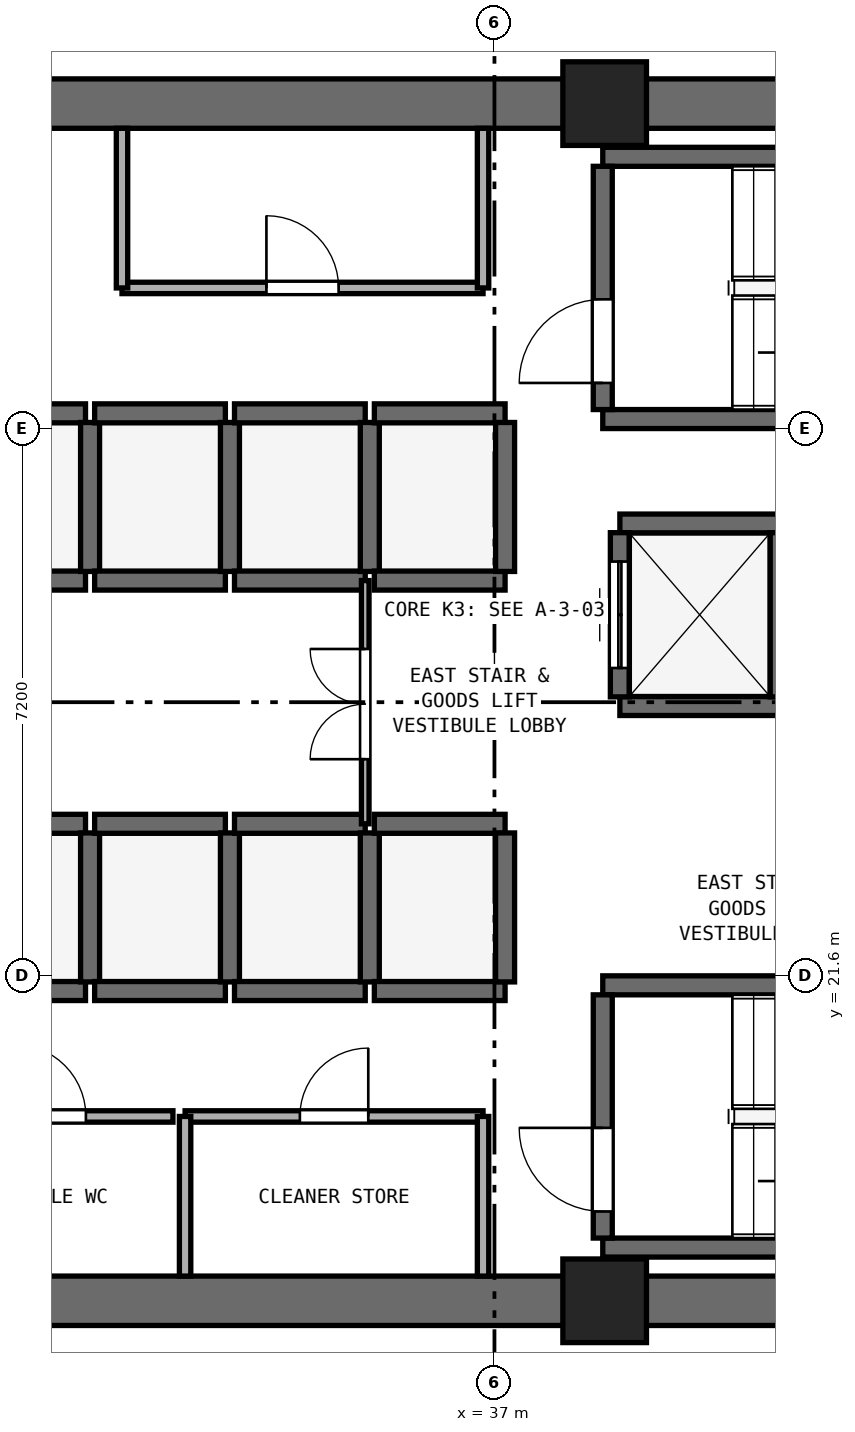
"""IFC4 building model, lengths in metres.
Left out: names, types, materials, properties, quantities, classifications, styles, units other than length and angle.
Written with IfcOpenShell. Run it as: python <this file> out.ifc"""

import sys

from ifc_helpers import new_model, si_unit, direction, frame, frame_2d, origin, origin_2d, place, context, subcontext, project, spatial, rectangle, extrude, element, fill, save


model = new_model("IFC4")
c1 = context("Model", 3, precision=1e-05, world=origin(), true_north=direction((0.0, 1.0)))
c2 = subcontext(c1, "Body", "Model", "MODEL_VIEW")
j1 = project(units=[si_unit("LENGTHUNIT", "METRE"), si_unit("PLANEANGLEUNIT", "RADIAN")], contexts=[c1])
p1 = place(None, origin())
s1 = spatial("IfcSite", under=j1, at=p1, CompositionType="ELEMENT")
p2 = place(p1, origin())
s2 = spatial("IfcBuilding", under=s1, at=p2, CompositionType="ELEMENT")
p3 = place(p2, frame((0.0, 0.0, 78.2)))
s3 = spatial("IfcBuildingStorey", under=s2, at=p3, CompositionType="ELEMENT", Elevation=78.2)
for number, where, z_axis, x_axis in (
    (1, (25.4, 17.325, 0.0), (0.0, 0.0, 1.0), (1.0, 0.0, 0.0)),
    (2, (25.4, 33.075, 0.0), (0.0, 0.0, 1.0), (1.0, 0.0, 0.0)),
):
    element("IfcWall", number, at=place(p3, frame(where, z_axis=z_axis, x_axis=x_axis)), inside=s3, PredefinedType="SHEAR", context=c2, shape_type="SweptSolid", body=[
        extrude(rectangle(XDim=23.2, YDim=0.65, at=frame_2d((11.6, 0.0))), origin(), (0.0, 0.0, 1.0), 3.525),
    ])
for number, where, z_axis, x_axis in (
    (3, (38.45, 17.325, 0.0), (0.0, 0.0, 1.0), (1.0, 0.0, 0.0)),
    (4, (38.45, 33.075, 0.0), (0.0, 0.0, 1.0), (1.0, 0.0, 0.0)),
):
    element("IfcColumn", number, at=place(p3, frame(where, z_axis=z_axis, x_axis=x_axis)), inside=s3, PredefinedType="PILASTER", context=c2, shape_type="SweptSolid", body=[
        extrude(rectangle(XDim=1.1, YDim=1.1, at=origin_2d()), origin(), (0.0, 0.0, 1.0), 3.8),
    ])
for number, where, z_axis, x_axis in (
    (5, (38.425, 28.925, 0.0), (0.0, 0.0, 1.0), (1.0, 0.0, 0.0)),
    (6, (38.425, 32.375, 0.0), (0.0, 0.0, 1.0), (1.0, 0.0, 0.0)),
):
    element("IfcWall", number, at=place(p3, frame(where, z_axis=z_axis, x_axis=x_axis)), inside=s3, PredefinedType="SHEAR", context=c2, shape_type="SweptSolid", body=[
        extrude(rectangle(XDim=7.3, YDim=0.25, at=frame_2d((3.65, 0.0))), origin(), (0.0, 0.0, 1.0), 3.525),
    ])
p4 = place(p3, frame((38.425, 29.05, 0.0), z_axis=(0.0, 0.0, 1.0), x_axis=(0.0, 1.0, 0.0)))
e7 = element("IfcWall", 7, at=p4, inside=s3, PredefinedType="SHEAR", context=c2, shape_type="SweptSolid", body=[
    extrude(rectangle(XDim=3.2, YDim=0.25, at=frame_2d((1.6, 0.0))), origin(), (0.0, 0.0, 1.0), 3.525),
])
p5 = place(p4, frame((0.35, 0.0, 0.0)))
e8 = element("IfcOpeningElement", 8, at=p5, cuts=e7, PredefinedType="OPENING", context=c2, shape_type="SweptSolid", body=[
    extrude(rectangle(XDim=1.1, YDim=2.15, at=frame_2d((0.55, 1.075))), frame((0.0, 0.135, 0.0), z_axis=(0.0, -1.0, 0.0), x_axis=(1.0, 0.0, 0.0)), (0.0, 0.0, 1.0), 0.27),
])
for number, where, z_axis, x_axis in (
    (9, (38.425, 18.025, 0.0), (0.0, 0.0, 1.0), (1.0, 0.0, 0.0)),
    (10, (38.425, 21.475, 0.0), (0.0, 0.0, 1.0), (1.0, 0.0, 0.0)),
):
    element("IfcWall", number, at=place(p3, frame(where, z_axis=z_axis, x_axis=x_axis)), inside=s3, PredefinedType="SHEAR", context=c2, shape_type="SweptSolid", body=[
        extrude(rectangle(XDim=7.3, YDim=0.25, at=frame_2d((3.65, 0.0))), origin(), (0.0, 0.0, 1.0), 3.525),
    ])
p6 = place(p3, frame((38.425, 18.15, 0.0), z_axis=(0.0, 0.0, 1.0), x_axis=(0.0, 1.0, 0.0)))
e11 = element("IfcWall", 11, at=p6, inside=s3, PredefinedType="SHEAR", context=c2, shape_type="SweptSolid", body=[
    extrude(rectangle(XDim=3.2, YDim=0.25, at=frame_2d((1.6, 0.0))), origin(), (0.0, 0.0, 1.0), 3.525),
])
p7 = place(p6, frame((0.35, 0.0, 0.0)))
e12 = element("IfcOpeningElement", 12, at=p7, cuts=e11, PredefinedType="OPENING", context=c2, shape_type="SweptSolid", body=[
    extrude(rectangle(XDim=1.1, YDim=2.15, at=frame_2d((0.55, 1.075))), frame((0.0, 0.135, 0.0), z_axis=(0.0, -1.0, 0.0), x_axis=(1.0, 0.0, 0.0)), (0.0, 0.0, 1.0), 0.27),
])
for number, where, z_axis, x_axis in (
    (13, (29.9, 21.4, 0.0), (0.0, 0.0, 1.0), (1.0, 0.0, 0.0)),
    (14, (29.9, 23.6, 0.0), (0.0, 0.0, 1.0), (1.0, 0.0, 0.0)),
):
    element("IfcWall", number, at=place(p3, frame(where, z_axis=z_axis, x_axis=x_axis)), inside=s3, PredefinedType="SHEAR", context=c2, shape_type="SweptSolid", body=[
        extrude(rectangle(XDim=1.72, YDim=0.25, at=frame_2d((0.86, 0.0))), origin(), (0.0, 0.0, 1.0), 3.525),
    ])
p8 = place(p3, frame((31.68, 21.52, 0.0), z_axis=(0.0, 0.0, 1.0), x_axis=(0.0, 1.0, 0.0)))
e15 = element("IfcWall", 15, at=p8, inside=s3, PredefinedType="SHEAR", context=c2, shape_type="SweptSolid", body=[
    extrude(rectangle(XDim=1.96, YDim=0.25, at=frame_2d((0.98, 0.0))), origin(), (0.0, 0.0, 1.0), 3.525),
])
for number, where, z_axis, x_axis in (
    (16, (31.74, 21.4, 0.0), (0.0, 0.0, 1.0), (1.0, 0.0, 0.0)),
    (17, (31.74, 23.6, 0.0), (0.0, 0.0, 1.0), (1.0, 0.0, 0.0)),
):
    element("IfcWall", number, at=place(p3, frame(where, z_axis=z_axis, x_axis=x_axis)), inside=s3, PredefinedType="SHEAR", context=c2, shape_type="SweptSolid", body=[
        extrude(rectangle(XDim=1.72, YDim=0.25, at=frame_2d((0.86, 0.0))), origin(), (0.0, 0.0, 1.0), 3.525),
    ])
p9 = place(p3, frame((33.52, 21.52, 0.0), z_axis=(0.0, 0.0, 1.0), x_axis=(0.0, 1.0, 0.0)))
e18 = element("IfcWall", 18, at=p9, inside=s3, PredefinedType="SHEAR", context=c2, shape_type="SweptSolid", body=[
    extrude(rectangle(XDim=1.96, YDim=0.25, at=frame_2d((0.98, 0.0))), origin(), (0.0, 0.0, 1.0), 3.525),
])
for number, where, z_axis, x_axis in (
    (19, (33.58, 21.4, 0.0), (0.0, 0.0, 1.0), (1.0, 0.0, 0.0)),
    (20, (33.58, 23.6, 0.0), (0.0, 0.0, 1.0), (1.0, 0.0, 0.0)),
):
    element("IfcWall", number, at=place(p3, frame(where, z_axis=z_axis, x_axis=x_axis)), inside=s3, PredefinedType="SHEAR", context=c2, shape_type="SweptSolid", body=[
        extrude(rectangle(XDim=1.72, YDim=0.25, at=frame_2d((0.86, 0.0))), origin(), (0.0, 0.0, 1.0), 3.525),
    ])
p10 = place(p3, frame((35.36, 21.52, 0.0), z_axis=(0.0, 0.0, 1.0), x_axis=(0.0, 1.0, 0.0)))
e21 = element("IfcWall", 21, at=p10, inside=s3, PredefinedType="SHEAR", context=c2, shape_type="SweptSolid", body=[
    extrude(rectangle(XDim=1.96, YDim=0.25, at=frame_2d((0.98, 0.0))), origin(), (0.0, 0.0, 1.0), 3.525),
])
for number, where, z_axis, x_axis in (
    (22, (35.42, 21.4, 0.0), (0.0, 0.0, 1.0), (1.0, 0.0, 0.0)),
    (23, (35.42, 23.6, 0.0), (0.0, 0.0, 1.0), (1.0, 0.0, 0.0)),
):
    element("IfcWall", number, at=place(p3, frame(where, z_axis=z_axis, x_axis=x_axis)), inside=s3, PredefinedType="SHEAR", context=c2, shape_type="SweptSolid", body=[
        extrude(rectangle(XDim=1.72, YDim=0.25, at=frame_2d((0.86, 0.0))), origin(), (0.0, 0.0, 1.0), 3.525),
    ])
p11 = place(p3, frame((37.14, 21.52, 0.0), z_axis=(0.0, 0.0, 1.0), x_axis=(0.0, 1.0, 0.0)))
e24 = element("IfcWall", 24, at=p11, inside=s3, PredefinedType="SHEAR", context=c2, shape_type="SweptSolid", body=[
    extrude(rectangle(XDim=1.96, YDim=0.25, at=frame_2d((0.98, 0.0))), origin(), (0.0, 0.0, 1.0), 3.525),
])
for number, where, z_axis, x_axis in (
    (25, (29.9, 26.8, 0.0), (0.0, 0.0, 1.0), (1.0, 0.0, 0.0)),
    (26, (29.9, 29.0, 0.0), (0.0, 0.0, 1.0), (1.0, 0.0, 0.0)),
):
    element("IfcWall", number, at=place(p3, frame(where, z_axis=z_axis, x_axis=x_axis)), inside=s3, PredefinedType="SHEAR", context=c2, shape_type="SweptSolid", body=[
        extrude(rectangle(XDim=1.72, YDim=0.25, at=frame_2d((0.86, 0.0))), origin(), (0.0, 0.0, 1.0), 3.525),
    ])
p12 = place(p3, frame((31.68, 26.92, 0.0), z_axis=(0.0, 0.0, 1.0), x_axis=(0.0, 1.0, 0.0)))
e27 = element("IfcWall", 27, at=p12, inside=s3, PredefinedType="SHEAR", context=c2, shape_type="SweptSolid", body=[
    extrude(rectangle(XDim=1.96, YDim=0.25, at=frame_2d((0.98, 0.0))), origin(), (0.0, 0.0, 1.0), 3.525),
])
for number, where, z_axis, x_axis in (
    (28, (31.74, 26.8, 0.0), (0.0, 0.0, 1.0), (1.0, 0.0, 0.0)),
    (29, (31.74, 29.0, 0.0), (0.0, 0.0, 1.0), (1.0, 0.0, 0.0)),
):
    element("IfcWall", number, at=place(p3, frame(where, z_axis=z_axis, x_axis=x_axis)), inside=s3, PredefinedType="SHEAR", context=c2, shape_type="SweptSolid", body=[
        extrude(rectangle(XDim=1.72, YDim=0.25, at=frame_2d((0.86, 0.0))), origin(), (0.0, 0.0, 1.0), 3.525),
    ])
p13 = place(p3, frame((33.52, 26.92, 0.0), z_axis=(0.0, 0.0, 1.0), x_axis=(0.0, 1.0, 0.0)))
e30 = element("IfcWall", 30, at=p13, inside=s3, PredefinedType="SHEAR", context=c2, shape_type="SweptSolid", body=[
    extrude(rectangle(XDim=1.96, YDim=0.25, at=frame_2d((0.98, 0.0))), origin(), (0.0, 0.0, 1.0), 3.525),
])
for number, where, z_axis, x_axis in (
    (31, (33.58, 26.8, 0.0), (0.0, 0.0, 1.0), (1.0, 0.0, 0.0)),
    (32, (33.58, 29.0, 0.0), (0.0, 0.0, 1.0), (1.0, 0.0, 0.0)),
):
    element("IfcWall", number, at=place(p3, frame(where, z_axis=z_axis, x_axis=x_axis)), inside=s3, PredefinedType="SHEAR", context=c2, shape_type="SweptSolid", body=[
        extrude(rectangle(XDim=1.72, YDim=0.25, at=frame_2d((0.86, 0.0))), origin(), (0.0, 0.0, 1.0), 3.525),
    ])
p14 = place(p3, frame((35.36, 26.92, 0.0), z_axis=(0.0, 0.0, 1.0), x_axis=(0.0, 1.0, 0.0)))
e33 = element("IfcWall", 33, at=p14, inside=s3, PredefinedType="SHEAR", context=c2, shape_type="SweptSolid", body=[
    extrude(rectangle(XDim=1.96, YDim=0.25, at=frame_2d((0.98, 0.0))), origin(), (0.0, 0.0, 1.0), 3.525),
])
for number, where, z_axis, x_axis in (
    (34, (35.42, 26.8, 0.0), (0.0, 0.0, 1.0), (1.0, 0.0, 0.0)),
    (35, (35.42, 29.0, 0.0), (0.0, 0.0, 1.0), (1.0, 0.0, 0.0)),
):
    element("IfcWall", number, at=place(p3, frame(where, z_axis=z_axis, x_axis=x_axis)), inside=s3, PredefinedType="SHEAR", context=c2, shape_type="SweptSolid", body=[
        extrude(rectangle(XDim=1.72, YDim=0.25, at=frame_2d((0.86, 0.0))), origin(), (0.0, 0.0, 1.0), 3.525),
    ])
p15 = place(p3, frame((37.14, 26.92, 0.0), z_axis=(0.0, 0.0, 1.0), x_axis=(0.0, 1.0, 0.0)))
e36 = element("IfcWall", 36, at=p15, inside=s3, PredefinedType="SHEAR", context=c2, shape_type="SweptSolid", body=[
    extrude(rectangle(XDim=1.96, YDim=0.25, at=frame_2d((0.98, 0.0))), origin(), (0.0, 0.0, 1.0), 3.525),
])
for number, where, z_axis, x_axis in (
    (37, (38.65, 25.15, 0.0), (0.0, 0.0, 1.0), (1.0, 0.0, 0.0)),
    (38, (38.65, 27.55, 0.0), (0.0, 0.0, 1.0), (1.0, 0.0, 0.0)),
):
    element("IfcWall", number, at=place(p3, frame(where, z_axis=z_axis, x_axis=x_axis)), inside=s3, PredefinedType="SHEAR", context=c2, shape_type="SweptSolid", body=[
        extrude(rectangle(XDim=2.1, YDim=0.25, at=frame_2d((1.05, 0.0))), origin(), (0.0, 0.0, 1.0), 3.525),
    ])
p16 = place(p3, frame((38.65, 25.27, 0.0), z_axis=(0.0, 0.0, 1.0), x_axis=(0.0, 1.0, 0.0)))
e39 = element("IfcWall", 39, at=p16, inside=s3, PredefinedType="SHEAR", context=c2, shape_type="SweptSolid", body=[
    extrude(rectangle(XDim=2.16, YDim=0.25, at=frame_2d((1.08, 0.0))), origin(), (0.0, 0.0, 1.0), 3.525),
])
p17 = place(p16, frame((0.38, 0.0, 0.0)))
e40 = element("IfcOpeningElement", 40, at=p17, cuts=e39, PredefinedType="OPENING", context=c2, shape_type="SweptSolid", body=[
    extrude(rectangle(XDim=1.4, YDim=2.2, at=frame_2d((0.7, 1.1))), frame((0.0, 0.135, 0.0), z_axis=(0.0, -1.0, 0.0), x_axis=(1.0, 0.0, 0.0)), (0.0, 0.0, 1.0), 0.27),
])
p18 = place(p3, frame((40.75, 25.27, 0.0), z_axis=(0.0, 0.0, 1.0), x_axis=(0.0, 1.0, 0.0)))
e41 = element("IfcWall", 41, at=p18, inside=s3, PredefinedType="SHEAR", context=c2, shape_type="SweptSolid", body=[
    extrude(rectangle(XDim=2.16, YDim=0.25, at=frame_2d((1.08, 0.0))), origin(), (0.0, 0.0, 1.0), 3.525),
])
p19 = place(p3, frame((32.1, 30.65, 0.0), z_axis=(0.0, 0.0, 1.0), x_axis=(1.0, 0.0, 0.0)))
e42 = element("IfcWall", 42, at=p19, inside=s3, PredefinedType="PARTITIONING", context=c2, shape_type="SweptSolid", body=[
    extrude(rectangle(XDim=4.75, YDim=0.15, at=frame_2d((2.375, 0.0))), origin(), (0.0, 0.0, 1.0), 3.525),
])
p20 = place(p19, frame((1.9, 0.0, 0.0)))
e43 = element("IfcOpeningElement", 43, at=p20, cuts=e42, PredefinedType="OPENING", context=c2, shape_type="SweptSolid", body=[
    extrude(rectangle(XDim=0.95, YDim=2.1, at=frame_2d((0.475, 1.05))), frame((0.0, 0.085, 0.0), z_axis=(0.0, -1.0, 0.0), x_axis=(1.0, 0.0, 0.0)), (0.0, 0.0, 1.0), 0.17),
])
for number, where, z_axis, x_axis in (
    (44, (32.1, 30.65, 0.0), (0.0, 0.0, 1.0), (0.0, 1.0, 0.0)),
    (45, (36.85, 30.65, 0.0), (0.0, 0.0, 1.0), (0.0, 1.0, 0.0)),
):
    element("IfcWall", number, at=place(p3, frame(where, z_axis=z_axis, x_axis=x_axis)), inside=s3, PredefinedType="PARTITIONING", context=c2, shape_type="SweptSolid", body=[
        extrude(rectangle(XDim=2.1, YDim=0.15, at=frame_2d((1.05, 0.0))), origin(), (0.0, 0.0, 1.0), 3.525),
    ])
p21 = place(p3, frame((29.53, 19.75, 0.0), z_axis=(0.0, 0.0, 1.0), x_axis=(1.0, 0.0, 0.0)))
e46 = element("IfcWall", 46, at=p21, inside=s3, PredefinedType="PARTITIONING", context=c2, shape_type="SweptSolid", body=[
    extrude(rectangle(XDim=3.24, YDim=0.15, at=frame_2d((1.62, 0.0))), origin(), (0.0, 0.0, 1.0), 3.525),
])
p22 = place(p21, frame((1.145, 0.0, 0.0)))
e47 = element("IfcOpeningElement", 47, at=p22, cuts=e46, PredefinedType="OPENING", context=c2, shape_type="SweptSolid", body=[
    extrude(rectangle(XDim=0.95, YDim=2.1, at=frame_2d((0.475, 1.05))), frame((0.0, 0.085, 0.0), z_axis=(0.0, -1.0, 0.0), x_axis=(1.0, 0.0, 0.0)), (0.0, 0.0, 1.0), 0.17),
])
p23 = place(p3, frame((32.93, 19.75, 0.0), z_axis=(0.0, 0.0, 1.0), x_axis=(1.0, 0.0, 0.0)))
e48 = element("IfcWall", 48, at=p23, inside=s3, PredefinedType="PARTITIONING", context=c2, shape_type="SweptSolid", body=[
    extrude(rectangle(XDim=3.92, YDim=0.15, at=frame_2d((1.96, 0.0))), origin(), (0.0, 0.0, 1.0), 3.525),
])
p24 = place(p23, frame((1.51, 0.0, 0.0)))
e49 = element("IfcOpeningElement", 49, at=p24, cuts=e48, PredefinedType="OPENING", context=c2, shape_type="SweptSolid", body=[
    extrude(rectangle(XDim=0.9, YDim=2.1, at=frame_2d((0.45, 1.05))), frame((0.0, 0.085, 0.0), z_axis=(0.0, -1.0, 0.0), x_axis=(1.0, 0.0, 0.0)), (0.0, 0.0, 1.0), 0.17),
])
for number, where, z_axis, x_axis in (
    (50, (32.93, 17.65, 0.0), (0.0, 0.0, 1.0), (0.0, 1.0, 0.0)),
    (51, (36.85, 17.65, 0.0), (0.0, 0.0, 1.0), (0.0, 1.0, 0.0)),
):
    element("IfcWall", number, at=place(p3, frame(where, z_axis=z_axis, x_axis=x_axis)), inside=s3, PredefinedType="PARTITIONING", context=c2, shape_type="SweptSolid", body=[
        extrude(rectangle(XDim=2.1, YDim=0.15, at=frame_2d((1.05, 0.0))), origin(), (0.0, 0.0, 1.0), 3.525),
    ])
p25 = place(p3, frame((35.3, 23.6, 0.0), z_axis=(0.0, 0.0, 1.0), x_axis=(0.0, 1.0, 0.0)))
e52 = element("IfcWall", 52, at=p25, inside=s3, PredefinedType="PARTITIONING", context=c2, shape_type="SweptSolid", body=[
    extrude(rectangle(XDim=3.2, YDim=0.1, at=frame_2d((1.6, 0.0))), origin(), (0.0, 0.0, 1.0), 3.525),
])
p26 = place(p25, frame((0.85, 0.0, 0.0)))
e53 = element("IfcOpeningElement", 53, at=p26, cuts=e52, PredefinedType="OPENING", context=c2, shape_type="SweptSolid", body=[
    extrude(rectangle(XDim=1.45, YDim=2.12, at=frame_2d((0.725, 1.06))), frame((0.0, 0.06, 0.0), z_axis=(0.0, -1.0, 0.0), x_axis=(1.0, 0.0, 0.0)), (0.0, 0.0, 1.0), 0.12),
])
p27 = place(p5, origin())
e54 = element("IfcDoor", 54, at=p27, inside=s3, OperationType="SINGLE_SWING_LEFT", PredefinedType="DOOR", context=c2, shape_type="SweptSolid", body=[
    extrude(rectangle(XDim=1.1, YDim=2.15, at=frame_2d((0.55, 1.075))), frame((0.0, 0.025, 0.0), z_axis=(0.0, -1.0, 0.0), x_axis=(1.0, 0.0, 0.0)), (0.0, 0.0, 1.0), 0.05),
])
fill(e8, e54)
p28 = place(p7, origin())
e55 = element("IfcDoor", 55, at=p28, inside=s3, OperationType="SINGLE_SWING_RIGHT", PredefinedType="DOOR", context=c2, shape_type="SweptSolid", body=[
    extrude(rectangle(XDim=1.1, YDim=2.15, at=frame_2d((0.55, 1.075))), frame((0.0, 0.025, 0.0), z_axis=(0.0, -1.0, 0.0), x_axis=(1.0, 0.0, 0.0)), (0.0, 0.0, 1.0), 0.05),
])
fill(e12, e55)
p29 = place(p17, origin())
e56 = element("IfcDoor", 56, at=p29, inside=s3, OperationType="DOUBLE_DOOR_SLIDING", PredefinedType="DOOR", context=c2, shape_type="SweptSolid", body=[
    extrude(rectangle(XDim=1.4, YDim=2.2, at=frame_2d((0.7, 1.1))), frame((0.0, 0.025, 0.0), z_axis=(0.0, -1.0, 0.0), x_axis=(1.0, 0.0, 0.0)), (0.0, 0.0, 1.0), 0.05),
])
fill(e40, e56)
p30 = place(p20, origin())
e57 = element("IfcDoor", 57, at=p30, inside=s3, OperationType="SINGLE_SWING_LEFT", PredefinedType="DOOR", context=c2, shape_type="SweptSolid", body=[
    extrude(rectangle(XDim=0.95, YDim=2.1, at=frame_2d((0.475, 1.05))), frame((0.0, 0.025, 0.0), z_axis=(0.0, -1.0, 0.0), x_axis=(1.0, 0.0, 0.0)), (0.0, 0.0, 1.0), 0.05),
])
fill(e43, e57)
p31 = place(p22, origin())
e58 = element("IfcDoor", 58, at=p31, inside=s3, OperationType="SINGLE_SWING_LEFT", PredefinedType="DOOR", context=c2, shape_type="SweptSolid", body=[
    extrude(rectangle(XDim=0.95, YDim=2.1, at=frame_2d((0.475, 1.05))), frame((0.0, 0.025, 0.0), z_axis=(0.0, -1.0, 0.0), x_axis=(1.0, 0.0, 0.0)), (0.0, 0.0, 1.0), 0.05),
])
fill(e47, e58)
p32 = place(p24, origin())
e59 = element("IfcDoor", 59, at=p32, inside=s3, OperationType="SINGLE_SWING_RIGHT", PredefinedType="DOOR", context=c2, shape_type="SweptSolid", body=[
    extrude(rectangle(XDim=0.9, YDim=2.1, at=frame_2d((0.45, 1.05))), frame((0.0, 0.025, 0.0), z_axis=(0.0, -1.0, 0.0), x_axis=(1.0, 0.0, 0.0)), (0.0, 0.0, 1.0), 0.05),
])
fill(e49, e59)
p33 = place(p26, origin())
e60 = element("IfcDoor", 60, at=p33, inside=s3, OperationType="DOUBLE_DOOR_SINGLE_SWING", PredefinedType="DOOR", context=c2, shape_type="SweptSolid", body=[
    extrude(rectangle(XDim=1.45, YDim=2.12, at=frame_2d((0.725, 1.06))), frame((0.0, 0.025, 0.0), z_axis=(0.0, -1.0, 0.0), x_axis=(1.0, 0.0, 0.0)), (0.0, 0.0, 1.0), 0.05),
])
fill(e53, e60)
save(model, sys.argv[1])
